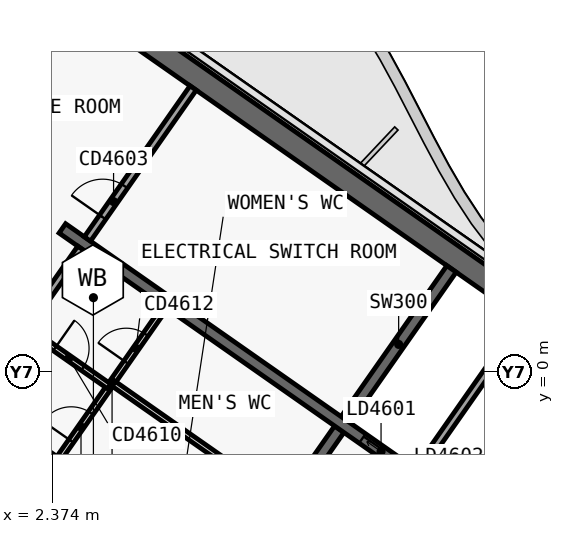
"""IFC4 building model, lengths in metres.
Left out: names, types, materials, properties, quantities, classifications, styles, units other than length and angle.
Written with IfcOpenShell. Run it as: python <this file> out.ifc"""

import sys

from ifc_helpers import new_model, si_unit, direction, frame, frame_2d, origin, place, context, subcontext, project, spatial, polyline, rectangle, outline, extrude, element, fill, save


model = new_model("IFC4")
c1 = context("Model", 3, precision=1e-05, world=origin(), true_north=direction((0.0, 1.0)))
c2 = subcontext(c1, "Body", "Model", "MODEL_VIEW")
j1 = project(units=[si_unit("LENGTHUNIT", "METRE"), si_unit("PLANEANGLEUNIT", "RADIAN")], contexts=[c1])
p1 = place(None, origin())
s1 = spatial("IfcSite", under=j1, at=p1, CompositionType="ELEMENT")
p2 = place(p1, origin())
s2 = spatial("IfcBuilding", under=s1, at=p2, CompositionType="ELEMENT")
p3 = place(p2, frame((0.0, 0.0, 252.7)))
s3 = spatial("IfcBuildingStorey", under=s2, at=p3, CompositionType="ELEMENT", Elevation=252.7)
p4 = place(p3, frame((0.028, 12.066, 0.0), z_axis=(0.0, 0.0, 1.0), x_axis=(0.819151382952, -0.573577380837, 0.0)))
e1 = element("IfcWall", 1, at=p4, inside=s3, PredefinedType="SHEAR", context=c2, shape_type="SweptSolid", body=[
    extrude(outline(polyline([(33.898, 0.3), (0.0, 0.3), (0.42, -0.3), (33.898, -0.3), (33.898, 0.3)])), origin(), (0.0, 0.0, 1.0), 3.9),
])
p5 = place(p3, frame((0.028, -0.874, 0.0), z_axis=(0.0, 0.0, 1.0), x_axis=(0.819150035022, -0.573579305871, 0.0)))
e2 = element("IfcWall", 2, at=p5, inside=s3, PredefinedType="SHEAR", context=c2, shape_type="SweptSolid", body=[
    extrude(outline(polyline([(26.476, 0.3), (0.0, 0.3), (0.42, -0.3), (26.476, -0.3), (26.476, 0.3)])), origin(), (0.0, 0.0, 1.0), 3.9),
])
p6 = place(p5, frame((0.826, 0.0, 0.0)))
e3 = element("IfcOpeningElement", 3, at=p6, cuts=e2, PredefinedType="OPENING", context=c2, shape_type="SweptSolid", body=[
    extrude(rectangle(XDim=1.5, YDim=2.1, at=frame_2d((0.75, 1.05))), frame((0.0, 0.31, 0.0), z_axis=(0.0, -1.0, 0.0), x_axis=(1.0, 0.0, 0.0)), (0.0, 0.0, 1.0), 0.62),
])
p7 = place(p5, frame((12.226, 0.0, 0.0)))
e4 = element("IfcOpeningElement", 4, at=p7, cuts=e2, PredefinedType="OPENING", context=c2, shape_type="SweptSolid", body=[
    extrude(rectangle(XDim=1.5, YDim=2.1, at=frame_2d((0.75, 1.05))), frame((0.0, 0.31, 0.0), z_axis=(0.0, -1.0, 0.0), x_axis=(1.0, 0.0, 0.0)), (0.0, 0.0, 1.0), 0.62),
])
p8 = place(p3, frame((7.143, -5.49, 0.0), z_axis=(0.0, 0.0, 1.0), x_axis=(0.573617744349, 0.819123118565, 0.0)))
e5 = element("IfcWall", 5, at=p8, inside=s3, PredefinedType="SHEAR", context=c2, shape_type="SweptSolid", body=[
    extrude(outline(polyline([(0.0, 0.15), (0.0, -0.15), (4.85, -0.15), (4.85, 0.15), (0.0, 0.15)])), origin(), (0.0, 0.0, 1.0), 3.9),
])
p9 = place(p3, frame((10.097, -1.271, 0.0), z_axis=(0.0, 0.0, 1.0), x_axis=(0.573560315113, 0.819163332265, 0.0)))
e6 = element("IfcWall", 6, at=p9, inside=s3, PredefinedType="SHEAR", context=c2, shape_type="SweptSolid", body=[
    extrude(outline(polyline([(4.85, -0.15), (4.85, 0.15), (0.0, 0.15), (0.0, -0.15), (4.85, -0.15)])), origin(), (0.0, 0.0, 1.0), 3.9),
])
p10 = place(p3, frame((2.638, 3.768, 0.0), z_axis=(0.0, 0.0, 1.0), x_axis=(0.819155014212, -0.573572194837, 0.0)))
e7 = element("IfcWall", 7, at=p10, inside=s3, PredefinedType="SHEAR", context=c2, shape_type="SweptSolid", body=[
    extrude(outline(polyline([(0.0, 0.15), (0.0, -0.15), (26.4, -0.15), (26.4, 0.15), (0.0, 0.15)])), origin(), (0.0, 0.0, 1.0), 3.9),
])
p11 = place(p10, frame((9.637, 0.0, 0.0)))
e8 = element("IfcOpeningElement", 8, at=p11, cuts=e7, PredefinedType="OPENING", context=c2, shape_type="SweptSolid", body=[
    extrude(rectangle(XDim=1.2, YDim=2.1, at=frame_2d((0.6, 1.05))), frame((0.0, 0.16, 0.0), z_axis=(0.0, -1.0, 0.0), x_axis=(1.0, 0.0, 0.0)), (0.0, 0.0, 1.0), 0.32),
])
p12 = place(p10, frame((11.812, 0.0, 0.0)))
e9 = element("IfcOpeningElement", 9, at=p12, cuts=e7, PredefinedType="OPENING", context=c2, shape_type="SweptSolid", body=[
    extrude(rectangle(XDim=1.2, YDim=2.1, at=frame_2d((0.6, 1.05))), frame((0.0, 0.16, 0.0), z_axis=(0.0, -1.0, 0.0), x_axis=(1.0, 0.0, 0.0)), (0.0, 0.0, 1.0), 0.32),
])
p13 = place(p10, frame((13.988, 0.0, 0.0)))
e10 = element("IfcOpeningElement", 10, at=p13, cuts=e7, PredefinedType="OPENING", context=c2, shape_type="SweptSolid", body=[
    extrude(rectangle(XDim=1.2, YDim=2.1, at=frame_2d((0.6, 1.05))), frame((0.0, 0.16, 0.0), z_axis=(0.0, -1.0, 0.0), x_axis=(1.0, 0.0, 0.0)), (0.0, 0.0, 1.0), 0.32),
])
p14 = place(p10, frame((16.262, 0.0, 0.0)))
e11 = element("IfcOpeningElement", 11, at=p14, cuts=e7, PredefinedType="OPENING", context=c2, shape_type="SweptSolid", body=[
    extrude(rectangle(XDim=1.0, YDim=2.1, at=frame_2d((0.5, 1.05))), frame((0.0, 0.16, 0.0), z_axis=(0.0, -1.0, 0.0), x_axis=(1.0, 0.0, 0.0)), (0.0, 0.0, 1.0), 0.32),
])
p15 = place(p3, frame((12.001, -2.605, 0.0), z_axis=(0.0, 0.0, 1.0), x_axis=(0.573560315113, 0.819163332265, 0.0)))
e12 = element("IfcWall", 12, at=p15, inside=s3, PredefinedType="SOLIDWALL", context=c2, shape_type="SweptSolid", body=[
    extrude(rectangle(XDim=4.85, YDim=0.2, at=frame_2d((2.425, 0.0))), origin(), (0.0, 0.0, 1.0), 3.9),
])
p16 = place(p3, frame((13.783, -3.852, 0.0), z_axis=(0.0, 0.0, 1.0), x_axis=(0.573594092424, 0.81913968109, 0.0)))
e13 = element("IfcWall", 13, at=p16, inside=s3, PredefinedType="SOLIDWALL", context=c2, shape_type="SweptSolid", body=[
    extrude(rectangle(XDim=4.85, YDim=0.2, at=frame_2d((2.425, 0.0))), origin(), (0.0, 0.0, 1.0), 3.9),
])
p17 = place(p3, frame((2.556, -2.278, 0.0), z_axis=(0.0, 0.0, 1.0), x_axis=(0.573560315113, 0.819163332265, 0.0)))
e14 = element("IfcWall", 14, at=p17, inside=s3, PredefinedType="PARTITIONING", context=c2, shape_type="SweptSolid", body=[
    extrude(rectangle(XDim=4.85, YDim=0.15, at=frame_2d((2.425, 0.0))), origin(), (0.0, 0.0, 1.0), 3.62),
])
p18 = place(p17, frame((0.55, 0.0, 0.0)))
e15 = element("IfcOpeningElement", 15, at=p18, cuts=e14, PredefinedType="OPENING", context=c2, shape_type="SweptSolid", body=[
    extrude(rectangle(XDim=0.9, YDim=2.1, at=frame_2d((0.45, 1.05))), frame((0.0, 0.085, 0.0), z_axis=(0.0, -1.0, 0.0), x_axis=(1.0, 0.0, 0.0)), (0.0, 0.0, 1.0), 0.17),
])
p19 = place(p17, frame((3.075, 0.0, 0.0)))
e16 = element("IfcOpeningElement", 16, at=p19, cuts=e14, PredefinedType="OPENING", context=c2, shape_type="SweptSolid", body=[
    extrude(rectangle(XDim=0.9, YDim=2.1, at=frame_2d((0.45, 1.05))), frame((0.0, 0.085, 0.0), z_axis=(0.0, -1.0, 0.0), x_axis=(1.0, 0.0, 0.0)), (0.0, 0.0, 1.0), 0.17),
])
p20 = place(p3, frame((1.745, 1.097, 0.0), z_axis=(0.0, 0.0, 1.0), x_axis=(0.819178980414, -0.573537965655, 0.0)))
e17 = element("IfcWall", 17, at=p20, inside=s3, PredefinedType="PARTITIONING", context=c2, shape_type="SweptSolid", body=[
    extrude(rectangle(XDim=2.6, YDim=0.15, at=frame_2d((1.3, 0.0))), origin(), (0.0, 0.0, 1.0), 3.62),
])
p21 = place(p20, frame((0.85, 0.0, 0.0)))
e18 = element("IfcOpeningElement", 18, at=p21, cuts=e17, PredefinedType="OPENING", context=c2, shape_type="SweptSolid", body=[
    extrude(rectangle(XDim=0.9, YDim=2.1, at=frame_2d((0.45, 1.05))), frame((0.0, 0.085, 0.0), z_axis=(0.0, -1.0, 0.0), x_axis=(1.0, 0.0, 0.0)), (0.0, 0.0, 1.0), 0.17),
])
p22 = place(p3, frame((3.947, -0.292, 0.0), z_axis=(0.0, 0.0, 1.0), x_axis=(0.819151939971, -0.573576585332, 0.0)))
e19 = element("IfcWall", 19, at=p22, inside=s3, PredefinedType="PARTITIONING", context=c2, shape_type="SweptSolid", body=[
    extrude(rectangle(XDim=5.45, YDim=0.15, at=frame_2d((2.725, 0.0))), origin(), (0.0, 0.0, 1.0), 3.62),
])
p23 = place(p3, frame((0.344, -0.729, 0.0), z_axis=(0.0, 0.0, 1.0), x_axis=(0.573560315113, 0.819163332265, 0.0)))
e20 = element("IfcWall", 20, at=p23, inside=s3, PredefinedType="SOLIDWALL", context=c2, shape_type="SweptSolid", body=[
    extrude(rectangle(XDim=4.85, YDim=0.2, at=frame_2d((2.425, 0.0))), origin(), (0.0, 0.0, 1.0), 3.62),
])
p24 = place(p23, frame((0.55, 0.0, 0.0)))
e21 = element("IfcOpeningElement", 21, at=p24, cuts=e20, PredefinedType="OPENING", context=c2, shape_type="SweptSolid", body=[
    extrude(rectangle(XDim=0.9, YDim=2.1, at=frame_2d((0.45, 1.05))), frame((0.0, 0.11, 0.0), z_axis=(0.0, -1.0, 0.0), x_axis=(1.0, 0.0, 0.0)), (0.0, 0.0, 1.0), 0.22),
])
p25 = place(p3, frame((3.298, 3.49, 0.0), z_axis=(0.0, 0.0, 1.0), x_axis=(0.573560315113, 0.819163332265, 0.0)))
e22 = element("IfcWall", 22, at=p25, inside=s3, PredefinedType="SOLIDWALL", context=c2, shape_type="SweptSolid", body=[
    extrude(rectangle(XDim=4.85, YDim=0.2, at=frame_2d((2.425, 0.0))), origin(), (0.0, 0.0, 1.0), 3.62),
])
p26 = place(p25, frame((0.7, 0.0, 0.0)))
e23 = element("IfcOpeningElement", 23, at=p26, cuts=e22, PredefinedType="OPENING", context=c2, shape_type="SweptSolid", body=[
    extrude(rectangle(XDim=1.0, YDim=2.1, at=frame_2d((0.5, 1.05))), frame((0.0, 0.11, 0.0), z_axis=(0.0, -1.0, 0.0), x_axis=(1.0, 0.0, 0.0)), (0.0, 0.0, 1.0), 0.22),
])
p27 = place(p11, origin())
e24 = element("IfcDoor", 24, at=p27, inside=s3, OperationType="SLIDING_TO_LEFT", PredefinedType="DOOR", context=c2, shape_type="SweptSolid", body=[
    extrude(rectangle(XDim=1.2, YDim=2.1, at=frame_2d((0.6, 1.05))), frame((0.0, 0.025, 0.0), z_axis=(0.0, -1.0, 0.0), x_axis=(1.0, 0.0, 0.0)), (0.0, 0.0, 1.0), 0.05),
])
fill(e8, e24)
p28 = place(p18, origin())
e25 = element("IfcDoor", 25, at=p28, inside=s3, OperationType="SINGLE_SWING_RIGHT", PredefinedType="DOOR", context=c2, shape_type="SweptSolid", body=[
    extrude(rectangle(XDim=0.9, YDim=2.1, at=frame_2d((0.45, 1.05))), frame((0.0, 0.025, 0.0), z_axis=(0.0, -1.0, 0.0), x_axis=(1.0, 0.0, 0.0)), (0.0, 0.0, 1.0), 0.05),
])
fill(e15, e25)
p29 = place(p21, origin())
e26 = element("IfcDoor", 26, at=p29, inside=s3, OperationType="SINGLE_SWING_RIGHT", PredefinedType="DOOR", context=c2, shape_type="SweptSolid", body=[
    extrude(rectangle(XDim=0.9, YDim=2.1, at=frame_2d((0.45, 1.05))), frame((0.0, 0.025, 0.0), z_axis=(0.0, -1.0, 0.0), x_axis=(1.0, 0.0, 0.0)), (0.0, 0.0, 1.0), 0.05),
])
fill(e18, e26)
p30 = place(p19, origin())
e27 = element("IfcDoor", 27, at=p30, inside=s3, OperationType="SINGLE_SWING_RIGHT", PredefinedType="DOOR", context=c2, shape_type="SweptSolid", body=[
    extrude(rectangle(XDim=0.9, YDim=2.1, at=frame_2d((0.45, 1.05))), frame((0.0, 0.025, 0.0), z_axis=(0.0, -1.0, 0.0), x_axis=(1.0, 0.0, 0.0)), (0.0, 0.0, 1.0), 0.05),
])
fill(e16, e27)
p31 = place(p26, origin())
e28 = element("IfcDoor", 28, at=p31, inside=s3, OperationType="SINGLE_SWING_RIGHT", PredefinedType="DOOR", context=c2, shape_type="SweptSolid", body=[
    extrude(rectangle(XDim=1.0, YDim=2.1, at=frame_2d((0.5, 1.05))), frame((0.0, 0.025, 0.0), z_axis=(0.0, -1.0, 0.0), x_axis=(1.0, 0.0, 0.0)), (0.0, 0.0, 1.0), 0.05),
])
fill(e23, e28)
save(model, sys.argv[1])
